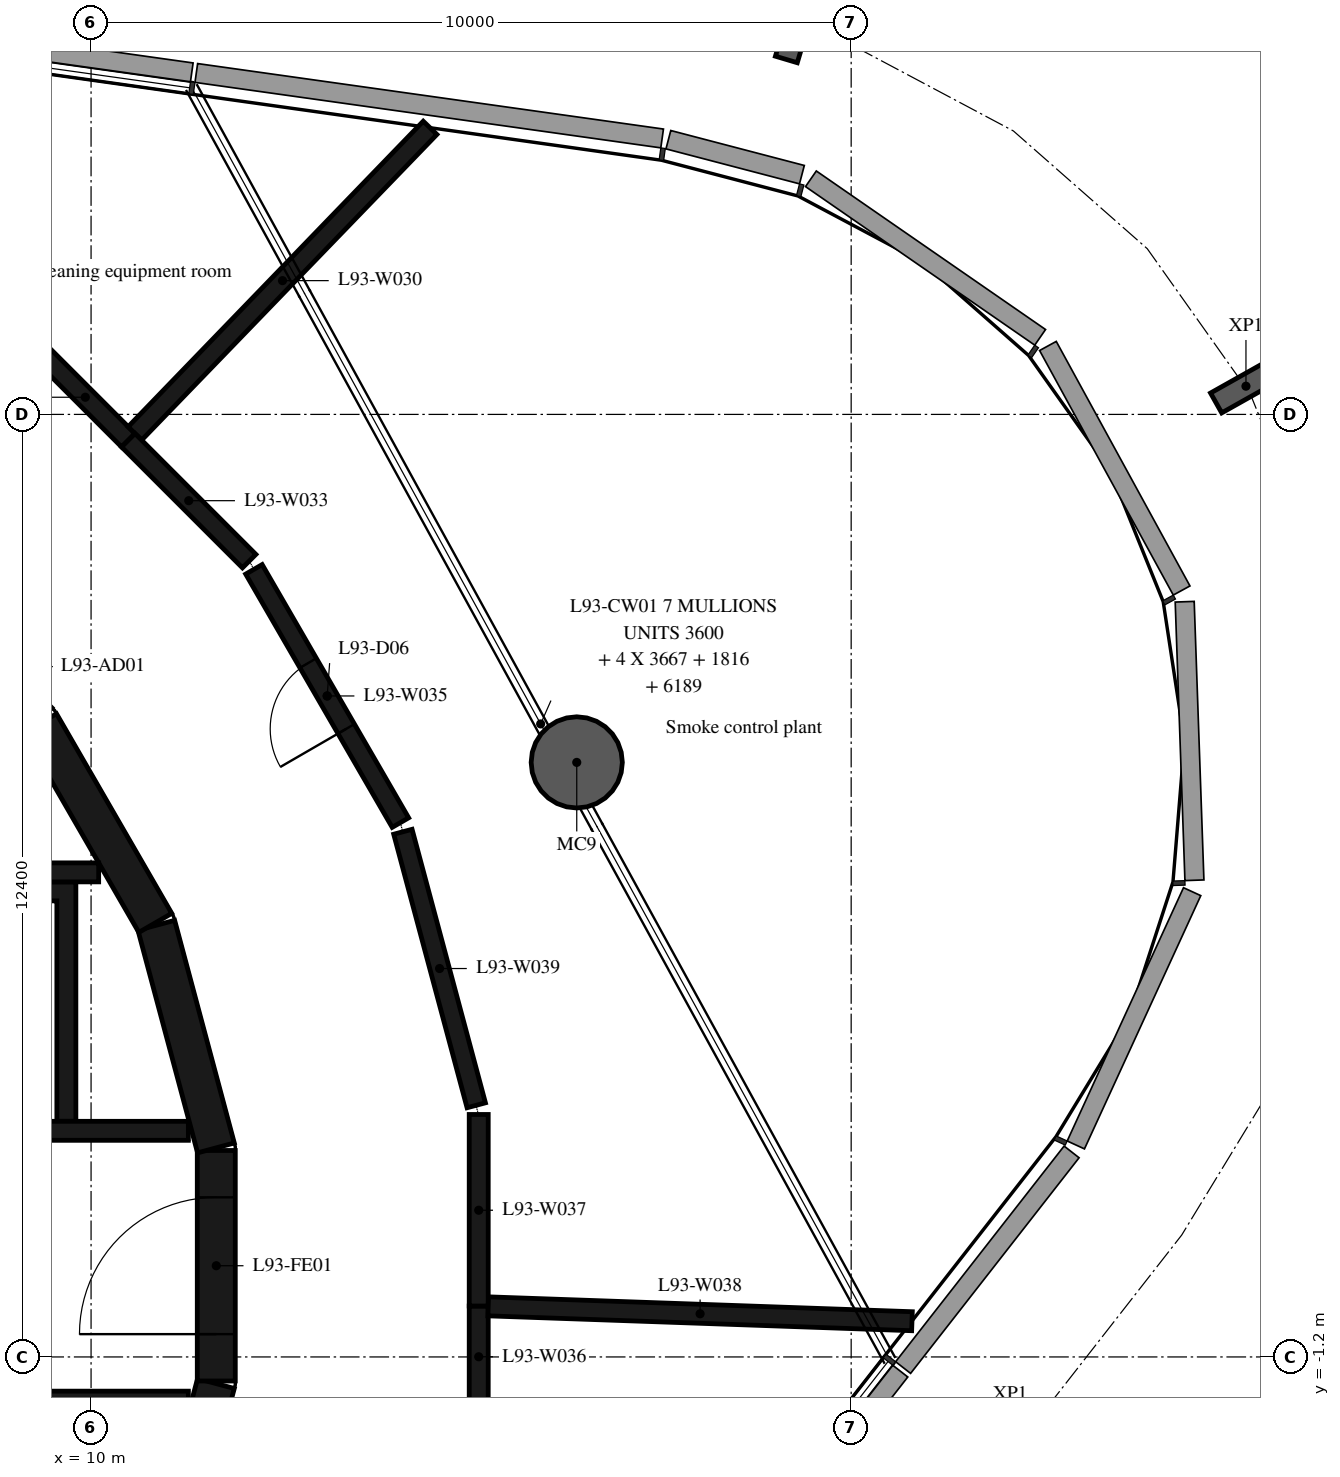
"""IFC4 building model, lengths in metres.
Left out: names, types, materials, properties, quantities, classifications, styles, units other than length and angle.
Written with IfcOpenShell. Run it as: python <this file> out.ifc"""

import sys

from ifc_helpers import new_model, si_unit, direction, frame, frame_2d, origin, origin_2d, place, context, subcontext, project, spatial, polyline, rectangle, hollow_circle, i_section, outline, extrude, element, fill, save


model = new_model("IFC4")
c1 = context("Model", 3, precision=1e-05, world=origin(), true_north=direction((0.0, 1.0)))
c2 = subcontext(c1, "Body", "Model", "MODEL_VIEW")
j1 = project(units=[si_unit("LENGTHUNIT", "METRE"), si_unit("PLANEANGLEUNIT", "RADIAN")], contexts=[c1])
p1 = place(None, origin())
s1 = spatial("IfcSite", under=j1, at=p1, CompositionType="ELEMENT")
p2 = place(p1, origin())
s2 = spatial("IfcBuilding", under=s1, at=p2, CompositionType="ELEMENT")
p3 = place(p2, frame((0.0, 0.0, 361.0)))
s3 = spatial("IfcBuildingStorey", under=s2, at=p3, CompositionType="ELEMENT", Elevation=361.0)
p4 = place(p3, frame((16.39, 6.622, -0.38), z_axis=(0.0, 0.0, 1.0), x_axis=(1.0, 0.0, 0.0)))
e1 = element("IfcColumn", 1, at=p4, inside=s3, PredefinedType="COLUMN", context=c2, shape_type="SweptSolid", body=[
    extrude(hollow_circle(Radius=0.6, WallThickness=0.03, at=origin_2d()), origin(), (0.0, 0.0, 1.0), 5.2),
])
for number, where, z_axis, x_axis in (
    (2, (25.194, 11.571, -0.38), (0.0, 0.0, 1.0), (0.49, -0.872, 0.0)),
    (3, (19.276, 16.301, -0.38), (0.0, 0.0, 1.0), (0.958, -0.286, 0.0)),
):
    element("IfcColumn", number, at=place(p3, frame(where, z_axis=z_axis, x_axis=x_axis)), inside=s3, PredefinedType="COLUMN", context=c2, shape_type="SweptSolid", body=[
        extrude(i_section(OverallWidth=0.3, OverallDepth=0.9, WebThickness=0.019, FlangeThickness=0.035, FilletRadius=0.03, at=origin_2d()), origin(), (0.0, 0.0, 1.0), 5.2),
    ])
p5 = place(p3, frame((10.858, -4.479, 0.0), z_axis=(0.0, 0.0, 1.0), x_axis=(0.258734743916, 0.965948410781, 0.0)))
e4 = element("IfcWall", 4, at=p5, inside=s3, PredefinedType="SHEAR", context=c2, shape_type="SweptSolid", body=[
    extrude(rectangle(XDim=3.033, YDim=0.5, at=frame_2d((1.516, 0.0))), origin(), (0.0, 0.0, 1.0), 4.82),
])
p6 = place(p3, frame((11.647, -1.516, 0.0), z_axis=(0.0, 0.0, 1.0), x_axis=(0.0, 1.0, 0.0)))
e5 = element("IfcWall", 5, at=p6, inside=s3, PredefinedType="SHEAR", context=c2, shape_type="SweptSolid", body=[
    extrude(rectangle(XDim=3.033, YDim=0.5, at=frame_2d((1.516, 0.0))), origin(), (0.0, 0.0, 1.0), 4.82),
])
p7 = place(p6, frame((0.616, 0.0, 0.0)))
e6 = element("IfcOpeningElement", 6, at=p7, cuts=e5, PredefinedType="OPENING", context=c2, shape_type="SweptSolid", body=[
    extrude(rectangle(XDim=1.8, YDim=2.1, at=frame_2d((0.9, 1.05))), frame((0.0, 0.26, 0.0), z_axis=(0.0, -1.0, 0.0), x_axis=(1.0, 0.0, 0.0)), (0.0, 0.0, 1.0), 0.52),
])
for number, where, z_axis, x_axis in (
    (7, (11.643, 1.55, 0.0), (0.0, 0.0, 1.0), (-0.259, 0.966, 0.0)),
    (8, (10.845, 4.51, 0.0), (0.0, 0.0, 1.0), (-0.5, 0.866, 0.0)),
):
    element("IfcWall", number, at=place(p3, frame(where, z_axis=z_axis, x_axis=x_axis)), inside=s3, PredefinedType="SHEAR", context=c2, shape_type="SweptSolid", body=[
        extrude(rectangle(XDim=3.033, YDim=0.5, at=frame_2d((1.516, 0.0))), origin(), (0.0, 0.0, 1.0), 4.82),
    ])
p8 = place(p3, frame((7.0, 5.175, 0.0), z_axis=(0.0, 0.0, 1.0), x_axis=(1.0, 0.0, 0.0)))
e9 = element("IfcWall", 9, at=p8, inside=s3, PredefinedType="SHEAR", context=c2, shape_type="SweptSolid", body=[
    extrude(rectangle(XDim=3.1, YDim=0.25, at=frame_2d((1.55, 0.0))), origin(), (0.0, 0.0, 1.0), 4.82),
])
p9 = place(p3, origin())
e10 = element("IfcWall", 10, at=p9, inside=s3, PredefinedType="SHEAR", context=c2, shape_type="SweptSolid", body=[
    extrude(outline(polyline([(-9.8, 1.9), (-9.55, 1.9), (-9.55, 4.8), (-5.5, 4.8), (-5.5, 1.9), (-5.25, 1.9), (-5.25, 4.8), (3.1, 4.8), (3.1, 1.9), (3.35, 1.9), (3.35, 4.8), (5.25, 4.8), (5.25, 1.9), (5.5, 1.9), (5.5, 4.8), (7.4, 4.8), (7.4, 1.9), (7.65, 1.9), (7.65, 4.8), (9.55, 4.8), (9.55, 1.9), (9.8, 1.9), (9.8, 4.8), (9.8, 5.05), (-9.8, 5.05), (-9.8, 4.8), (-9.8, 1.9)])), origin(), (0.0, 0.0, 1.0), 4.82),
])
p10 = place(p3, frame((3.35, 1.775, 0.0), z_axis=(0.0, 0.0, 1.0), x_axis=(1.0, 0.0, 0.0)))
e11 = element("IfcWall", 11, at=p10, inside=s3, PredefinedType="SHEAR", context=c2, shape_type="SweptSolid", body=[
    extrude(rectangle(XDim=7.93, YDim=0.25, at=frame_2d((3.965, 0.0))), origin(), (0.0, 0.0, 1.0), 4.82),
])
p11 = place(p10, frame((0.35, 0.0, 0.0)))
e12 = element("IfcOpeningElement", 12, at=p11, cuts=e11, PredefinedType="OPENING", context=c2, shape_type="SweptSolid", body=[
    extrude(rectangle(XDim=1.2, YDim=2.4, at=frame_2d((0.6, 1.2))), frame((0.0, 0.135, 0.0), z_axis=(0.0, -1.0, 0.0), x_axis=(1.0, 0.0, 0.0)), (0.0, 0.0, 1.0), 0.27),
])
p12 = place(p10, frame((2.5, 0.0, 0.0)))
e13 = element("IfcOpeningElement", 13, at=p12, cuts=e11, PredefinedType="OPENING", context=c2, shape_type="SweptSolid", body=[
    extrude(rectangle(XDim=1.2, YDim=2.4, at=frame_2d((0.6, 1.2))), frame((0.0, 0.135, 0.0), z_axis=(0.0, -1.0, 0.0), x_axis=(1.0, 0.0, 0.0)), (0.0, 0.0, 1.0), 0.27),
])
p13 = place(p10, frame((4.75, 0.0, 0.0)))
e14 = element("IfcOpeningElement", 14, at=p13, cuts=e11, PredefinedType="OPENING", context=c2, shape_type="SweptSolid", body=[
    extrude(rectangle(XDim=1.0, YDim=2.4, at=frame_2d((0.5, 1.2))), frame((0.0, 0.135, 0.0), z_axis=(0.0, -1.0, 0.0), x_axis=(1.0, 0.0, 0.0)), (0.0, 0.0, 1.0), 0.27),
])
p14 = place(p3, frame((3.35, -1.775, 0.0), z_axis=(0.0, 0.0, 1.0), x_axis=(1.0, 0.0, 0.0)))
e15 = element("IfcWall", 15, at=p14, inside=s3, PredefinedType="SHEAR", context=c2, shape_type="SweptSolid", body=[
    extrude(rectangle(XDim=7.93, YDim=0.25, at=frame_2d((3.965, 0.0))), origin(), (0.0, 0.0, 1.0), 4.82),
])
p15 = place(p14, frame((0.4, 0.0, 0.0)))
e16 = element("IfcOpeningElement", 16, at=p15, cuts=e15, PredefinedType="OPENING", context=c2, shape_type="SweptSolid", body=[
    extrude(rectangle(XDim=1.1, YDim=2.4, at=frame_2d((0.55, 1.2))), frame((0.0, 0.135, 0.0), z_axis=(0.0, -1.0, 0.0), x_axis=(1.0, 0.0, 0.0)), (0.0, 0.0, 1.0), 0.27),
])
p16 = place(p14, frame((2.55, 0.0, 0.0)))
e17 = element("IfcOpeningElement", 17, at=p16, cuts=e15, PredefinedType="OPENING", context=c2, shape_type="SweptSolid", body=[
    extrude(rectangle(XDim=1.1, YDim=2.4, at=frame_2d((0.55, 1.2))), frame((0.0, 0.135, 0.0), z_axis=(0.0, -1.0, 0.0), x_axis=(1.0, 0.0, 0.0)), (0.0, 0.0, 1.0), 0.27),
])
p17 = place(p14, frame((4.7, 0.0, 0.0)))
e18 = element("IfcOpeningElement", 18, at=p17, cuts=e15, PredefinedType="OPENING", context=c2, shape_type="SweptSolid", body=[
    extrude(rectangle(XDim=1.1, YDim=2.4, at=frame_2d((0.55, 1.2))), frame((0.0, 0.135, 0.0), z_axis=(0.0, -1.0, 0.0), x_axis=(1.0, 0.0, 0.0)), (0.0, 0.0, 1.0), 0.27),
])
p18 = place(p3, frame((10.49, 10.86, 0.0), z_axis=(0.0, 0.0, 1.0), x_axis=(-0.707106781187, 0.707106781187, 0.0)))
e19 = element("IfcWall", 19, at=p18, inside=s3, PredefinedType="PARTITIONING", context=c2, shape_type="SweptSolid", body=[
    extrude(rectangle(XDim=1.6, YDim=0.25, at=frame_2d((0.8, 0.0))), origin(), (0.0, 0.0, 1.0), 4.82),
])
p19 = place(p3, frame((10.577, 10.95, 0.0), z_axis=(0.0, 0.0, 1.0), x_axis=(0.694748067219, 0.719253170376, 0.0)))
e20 = element("IfcWall", 20, at=p19, inside=s3, PredefinedType="PARTITIONING", context=c2, shape_type="SweptSolid", body=[
    extrude(rectangle(XDim=5.589, YDim=0.25, at=frame_2d((2.794, 0.0))), origin(), (0.0, 0.0, 1.0), 4.82),
])
p20 = place(p3, frame((12.08, 9.27, 0.0), z_axis=(0.0, 0.0, 1.0), x_axis=(-0.707106781187, 0.707106781187, 0.0)))
e21 = element("IfcWall", 21, at=p20, inside=s3, PredefinedType="PARTITIONING", context=c2, shape_type="SweptSolid", body=[
    extrude(rectangle(XDim=2.249, YDim=0.25, at=frame_2d((1.125, 0.0))), origin(), (0.0, 0.0, 1.0), 4.82),
])
p21 = place(p3, frame((14.07, 5.83, 0.0), z_axis=(0.0, 0.0, 1.0), x_axis=(-0.500756218026, 0.865588360659, 0.0)))
e22 = element("IfcWall", 22, at=p21, inside=s3, PredefinedType="PARTITIONING", context=c2, shape_type="SweptSolid", body=[
    extrude(rectangle(XDim=3.849, YDim=0.25, at=frame_2d((1.925, 0.0))), origin(), (0.0, 0.0, 1.0), 4.82),
])
p22 = place(p21, frame((1.425, 0.0, 0.0)))
e23 = element("IfcOpeningElement", 23, at=p22, cuts=e22, PredefinedType="OPENING", context=c2, shape_type="SweptSolid", body=[
    extrude(rectangle(XDim=1.0, YDim=2.1, at=frame_2d((0.5, 1.05))), frame((0.0, 0.135, 0.0), z_axis=(0.0, -1.0, 0.0), x_axis=(1.0, 0.0, 0.0)), (0.0, 0.0, 1.0), 0.27),
])
p23 = place(p3, frame((15.1, -1.865, 0.0), z_axis=(0.0, 0.0, 1.0), x_axis=(0.0, 1.0, 0.0)))
e24 = element("IfcWall", 24, at=p23, inside=s3, PredefinedType="PARTITIONING", context=c2, shape_type="SweptSolid", body=[
    extrude(rectangle(XDim=1.335, YDim=0.25, at=frame_2d((0.667, 0.0))), origin(), (0.0, 0.0, 1.0), 4.82),
])
p24 = place(p3, frame((15.1, -0.53, 0.0), z_axis=(0.0, 0.0, 1.0), x_axis=(0.0, 1.0, 0.0)))
e25 = element("IfcWall", 25, at=p24, inside=s3, PredefinedType="PARTITIONING", context=c2, shape_type="SweptSolid", body=[
    extrude(rectangle(XDim=2.52, YDim=0.25, at=frame_2d((1.26, 0.0))), origin(), (0.0, 0.0, 1.0), 4.82),
])
p25 = place(p3, frame((15.225, -0.534, 0.0), z_axis=(0.0, 0.0, 1.0), x_axis=(0.999385397325, -0.035054637557, 0.0)))
e26 = element("IfcWall", 26, at=p25, inside=s3, PredefinedType="PARTITIONING", context=c2, shape_type="SweptSolid", body=[
    extrude(rectangle(XDim=5.579, YDim=0.25, at=frame_2d((2.789, 0.0))), origin(), (0.0, 0.0, 1.0), 4.43),
])
p26 = place(p3, frame((15.068, 2.111, 0.0), z_axis=(0.0, 0.0, 1.0), x_axis=(-0.259106201401, 0.965848837239, 0.0)))
e27 = element("IfcWall", 27, at=p26, inside=s3, PredefinedType="PARTITIONING", context=c2, shape_type="SweptSolid", body=[
    extrude(rectangle(XDim=3.726, YDim=0.25, at=frame_2d((1.863, 0.0))), origin(), (0.0, 0.0, 1.0), 4.82),
])
p27 = place(p7, origin())
e28 = element("IfcDoor", 28, at=p27, inside=s3, OperationType="DOUBLE_DOOR_SINGLE_SWING", PredefinedType="DOOR", context=c2, shape_type="SweptSolid", body=[
    extrude(rectangle(XDim=1.8, YDim=2.1, at=frame_2d((0.9, 1.05))), frame((0.0, 0.025, 0.0), z_axis=(0.0, -1.0, 0.0), x_axis=(1.0, 0.0, 0.0)), (0.0, 0.0, 1.0), 0.05),
])
fill(e6, e28)
p28 = place(p22, origin())
e29 = element("IfcDoor", 29, at=p28, inside=s3, OperationType="SINGLE_SWING_LEFT", PredefinedType="DOOR", context=c2, shape_type="SweptSolid", body=[
    extrude(rectangle(XDim=1.0, YDim=2.1, at=frame_2d((0.5, 1.05))), frame((0.0, 0.025, 0.0), z_axis=(0.0, -1.0, 0.0), x_axis=(1.0, 0.0, 0.0)), (0.0, 0.0, 1.0), 0.05),
])
fill(e23, e29)
save(model, sys.argv[1])
